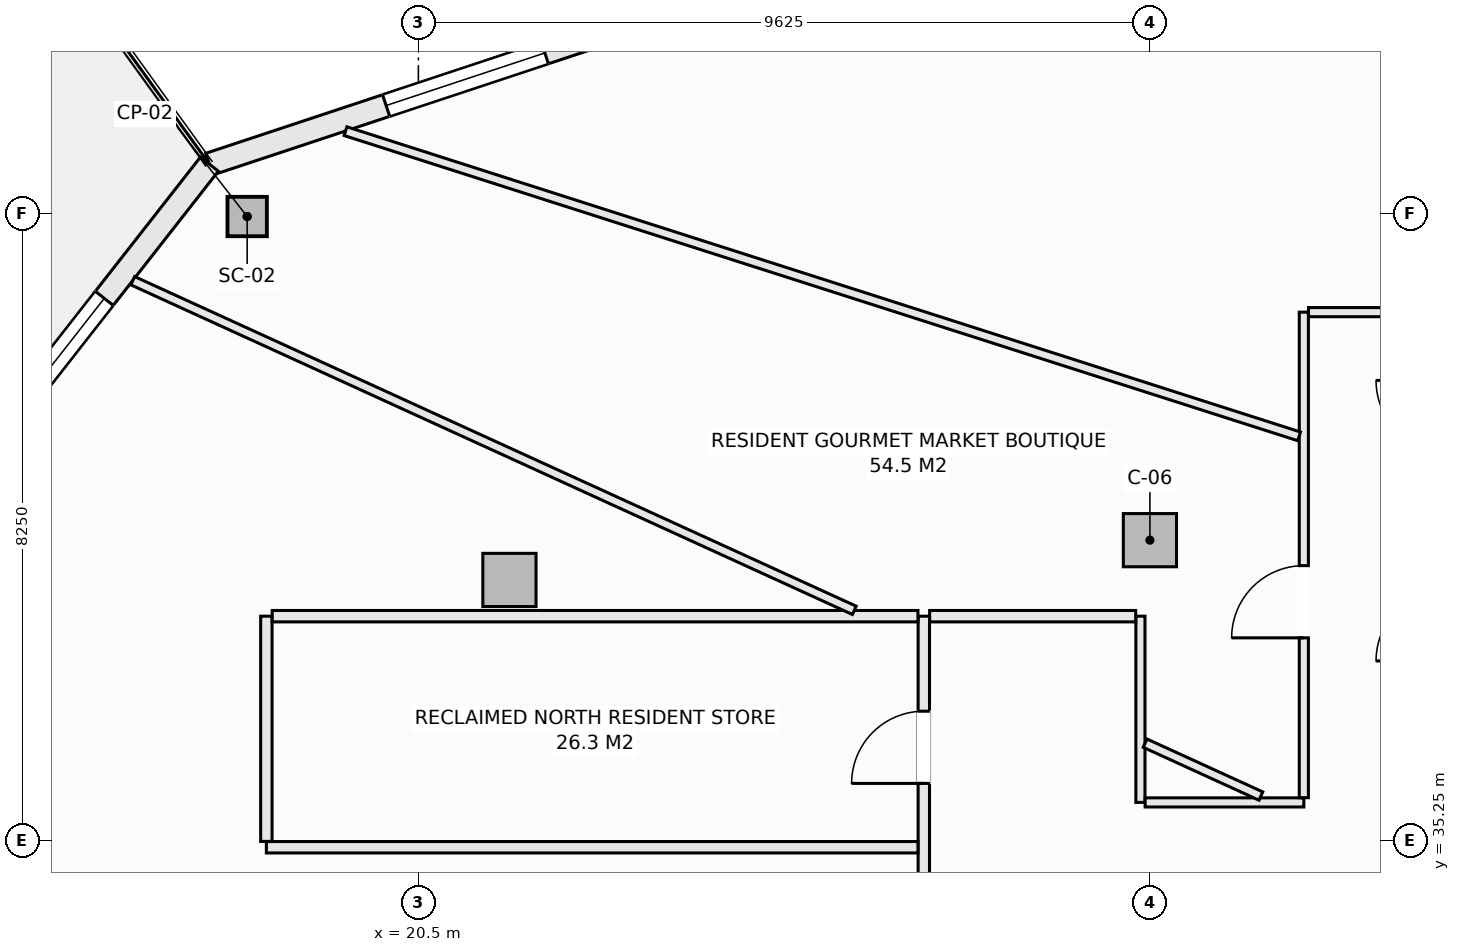
"""IFC4 building model, lengths in metres.
Left out: names, types, materials, properties, quantities, classifications, styles, units other than length and angle.
Written with IfcOpenShell. Run it as: python <this file> out.ifc"""

import sys

from ifc_helpers import new_model, si_unit, direction, frame, frame_2d, origin, origin_2d, place, context, subcontext, project, spatial, rectangle, hollow_rectangle, extrude, element, fill, save


model = new_model("IFC4")
c1 = context("Model", 3, precision=1e-05, world=origin(), true_north=direction((0.0, 1.0)))
c2 = subcontext(c1, "Body", "Model", "MODEL_VIEW")
j1 = project(units=[si_unit("LENGTHUNIT", "METRE"), si_unit("PLANEANGLEUNIT", "RADIAN")], contexts=[c1])
p1 = place(None, origin())
s1 = spatial("IfcSite", under=j1, at=p1, CompositionType="ELEMENT")
p2 = place(p1, origin())
s2 = spatial("IfcBuilding", under=s1, at=p2, CompositionType="ELEMENT")
p3 = place(p2, frame((0.0, 0.0, 236.0)))
s3 = spatial("IfcBuildingStorey", under=s2, at=p3, CompositionType="ELEMENT", Elevation=236.0)
p4 = place(p3, frame((18.247, 43.458, -0.27), z_axis=(0.0, 0.0, 1.0), x_axis=(1.0, 0.0, 0.0)))
e1 = element("IfcColumn", 1, at=p4, inside=s3, PredefinedType="COLUMN", context=c2, shape_type="SweptSolid", body=[
    extrude(hollow_rectangle(XDim=0.508, YDim=0.508, WallThickness=0.019, at=origin_2d()), origin(), (0.0, 0.0, 1.0), 3.3),
])
for number, where, z_axis, x_axis in (
    (2, (30.125, 39.2, -0.27), (0.0, 0.0, 1.0), (1.0, 0.0, 0.0)),
    (3, (21.698, 38.677, -0.27), (0.0, 0.0, 1.0), (1.0, 0.0, 0.0)),
):
    element("IfcColumn", number, at=place(p3, frame(where, z_axis=z_axis, x_axis=x_axis)), inside=s3, PredefinedType="COLUMN", context=c2, shape_type="SweptSolid", body=[
        extrude(rectangle(XDim=0.7, YDim=0.7, at=origin_2d()), origin(), (0.0, 0.0, 1.0), 3.3),
    ])
p5 = place(p3, frame((17.75, 44.147, 0.0), z_axis=(0.0, 0.0, 1.0), x_axis=(0.949240877604, 0.314550085495, 0.0)))
e4 = element("IfcWall", 4, at=p5, inside=s3, PredefinedType="SOLIDWALL", context=c2, shape_type="SweptSolid", body=[
    extrude(rectangle(XDim=6.288, YDim=0.3, at=frame_2d((3.144, 0.0))), origin(), (0.0, 0.0, 1.0), 2.605),
])
p6 = place(p5, frame((2.45, 0.0, 0.72)))
e5 = element("IfcOpeningElement", 5, at=p6, cuts=e4, PredefinedType="OPENING", context=c2, shape_type="SweptSolid", body=[
    extrude(rectangle(XDim=2.2, YDim=1.65, at=frame_2d((1.1, 0.825))), frame((0.0, 0.16, 0.0), z_axis=(0.0, -1.0, 0.0), x_axis=(1.0, 0.0, 0.0)), (0.0, 0.0, 1.0), 0.32),
])
p7 = place(p3, frame((14.117, 39.507, 0.0), z_axis=(0.0, 0.0, 1.0), x_axis=(0.616450126935, 0.787393955401, 0.0)))
e6 = element("IfcWall", 6, at=p7, inside=s3, PredefinedType="SOLIDWALL", context=c2, shape_type="SweptSolid", body=[
    extrude(rectangle(XDim=5.893, YDim=0.3, at=frame_2d((2.946, 0.0))), origin(), (0.0, 0.0, 1.0), 2.605),
])
p8 = place(p7, frame((1.45, 0.0, 0.72)))
e7 = element("IfcOpeningElement", 7, at=p8, cuts=e6, PredefinedType="OPENING", context=c2, shape_type="SweptSolid", body=[
    extrude(rectangle(XDim=2.2, YDim=1.65, at=frame_2d((1.1, 0.825))), frame((0.0, 0.16, 0.0), z_axis=(0.0, -1.0, 0.0), x_axis=(1.0, 0.0, 0.0)), (0.0, 0.0, 1.0), 0.32),
])
p9 = place(p3, frame((11.427, 41.559, 0.0), z_axis=(0.0, 0.0, 1.0), x_axis=(0.632697312147, 0.774399193699, 0.0)))
e8 = element("IfcWall", 8, at=p9, inside=s3, PredefinedType="PARAPET", context=c2, shape_type="SweptSolid", body=[
    extrude(rectangle(XDim=6.914, YDim=0.22, at=frame_2d((3.457, 0.0))), origin(), (0.0, 0.0, 1.0), 0.52),
])
p10 = place(p3, frame((27.15, 34.002, 0.0), z_axis=(0.0, 0.0, 1.0), x_axis=(0.0, 1.0, 0.0)))
e9 = element("IfcWall", 9, at=p10, inside=s3, PredefinedType="PARTITIONING", context=c2, shape_type="SweptSolid", body=[
    extrude(rectangle(XDim=4.198, YDim=0.15, at=frame_2d((2.099, 0.0))), origin(), (0.0, 0.0, 1.0), 3.03),
])
p11 = place(p10, frame((1.998, 0.0, 0.0)))
e10 = element("IfcOpeningElement", 10, at=p11, cuts=e9, PredefinedType="OPENING", context=c2, shape_type="SweptSolid", body=[
    extrude(rectangle(XDim=0.95, YDim=2.1, at=frame_2d((0.475, 1.05))), frame((0.0, 0.085, 0.0), z_axis=(0.0, -1.0, 0.0), x_axis=(1.0, 0.0, 0.0)), (0.0, 0.0, 1.0), 0.17),
])
p12 = place(p3, frame((30.0, 35.75, 0.0), z_axis=(0.0, 0.0, 1.0), x_axis=(0.0, 1.0, 0.0)))
e11 = element("IfcWall", 11, at=p12, inside=s3, PredefinedType="PARTITIONING", context=c2, shape_type="SweptSolid", body=[
    extrude(rectangle(XDim=2.45, YDim=0.12, at=frame_2d((1.225, 0.0))), origin(), (0.0, 0.0, 1.0), 3.03),
])
p13 = place(p3, frame((18.5, 35.16, 0.0), z_axis=(0.0, 0.0, 1.0), x_axis=(1.0, 0.0, 0.0)))
e12 = element("IfcWall", 12, at=p13, inside=s3, PredefinedType="PARTITIONING", context=c2, shape_type="SweptSolid", body=[
    extrude(rectangle(XDim=8.573, YDim=0.15, at=frame_2d((4.287, 0.0))), origin(), (0.0, 0.0, 1.0), 3.03),
])
p14 = place(p3, frame((18.5, 35.237, 0.0), z_axis=(0.0, 0.0, 1.0), x_axis=(0.0, 1.0, 0.0)))
e13 = element("IfcWall", 13, at=p14, inside=s3, PredefinedType="PARTITIONING", context=c2, shape_type="SweptSolid", body=[
    extrude(rectangle(XDim=2.963, YDim=0.15, at=frame_2d((1.481, 0.0))), origin(), (0.0, 0.0, 1.0), 3.03),
])
p15 = place(p3, frame((18.577, 38.2, 0.0), z_axis=(0.0, 0.0, 1.0), x_axis=(1.0, 0.0, 0.0)))
e14 = element("IfcWall", 14, at=p15, inside=s3, PredefinedType="PARTITIONING", context=c2, shape_type="SweptSolid", body=[
    extrude(rectangle(XDim=8.496, YDim=0.15, at=frame_2d((4.248, 0.0))), origin(), (0.0, 0.0, 1.0), 3.03),
])
p16 = place(p3, frame((27.227, 38.2, 0.0), z_axis=(0.0, 0.0, 1.0), x_axis=(1.0, 0.0, 0.0)))
e15 = element("IfcWall", 15, at=p16, inside=s3, PredefinedType="PARTITIONING", context=c2, shape_type="SweptSolid", body=[
    extrude(rectangle(XDim=2.711, YDim=0.15, at=frame_2d((1.355, 0.0))), origin(), (0.0, 0.0, 1.0), 3.03),
])
p17 = place(p3, frame((30.062, 35.75, 0.0), z_axis=(0.0, 0.0, 1.0), x_axis=(1.0, 0.0, 0.0)))
e16 = element("IfcWall", 16, at=p17, inside=s3, PredefinedType="PARTITIONING", context=c2, shape_type="SweptSolid", body=[
    extrude(rectangle(XDim=2.088, YDim=0.12, at=frame_2d((1.044, 0.0))), origin(), (0.0, 0.0, 1.0), 3.03),
])
p18 = place(p3, frame((32.15, 35.812, 0.0), z_axis=(0.0, 0.0, 1.0), x_axis=(0.0, 1.0, 0.0)))
e17 = element("IfcWall", 17, at=p18, inside=s3, PredefinedType="PARTITIONING", context=c2, shape_type="SweptSolid", body=[
    extrude(rectangle(XDim=6.388, YDim=0.12, at=frame_2d((3.194, 0.0))), origin(), (0.0, 0.0, 1.0), 3.03),
])
p19 = place(p18, frame((2.103, 0.0, 0.0)))
e18 = element("IfcOpeningElement", 18, at=p19, cuts=e17, PredefinedType="OPENING", context=c2, shape_type="SweptSolid", body=[
    extrude(rectangle(XDim=0.95, YDim=2.1, at=frame_2d((0.475, 1.05))), frame((0.0, 0.07, 0.0), z_axis=(0.0, -1.0, 0.0), x_axis=(1.0, 0.0, 0.0)), (0.0, 0.0, 1.0), 0.14),
])
p20 = place(p3, frame((32.212, 42.2, 0.0), z_axis=(0.0, 0.0, 1.0), x_axis=(1.0, 0.0, 0.0)))
e19 = element("IfcWall", 19, at=p20, inside=s3, PredefinedType="PARTITIONING", context=c2, shape_type="SweptSolid", body=[
    extrude(rectangle(XDim=1.838, YDim=0.12, at=frame_2d((0.919, 0.0))), origin(), (0.0, 0.0, 1.0), 3.03),
])
p21 = place(p3, frame((16.742, 42.613, 0.0), z_axis=(0.0, 0.0, 1.0), x_axis=(0.909603068398, -0.415478348365, 0.0)))
e20 = element("IfcWall", 20, at=p21, inside=s3, PredefinedType="PARTITIONING", context=c2, shape_type="SweptSolid", body=[
    extrude(rectangle(XDim=10.437, YDim=0.12, at=frame_2d((5.218, 0.0))), origin(), (0.0, 0.0, 1.0), 1.823),
])
p22 = place(p3, frame((30.062, 36.529, 0.0), z_axis=(0.0, 0.0, 1.0), x_axis=(0.909595755729, -0.415494357555, 0.0)))
e21 = element("IfcWall", 21, at=p22, inside=s3, PredefinedType="PARTITIONING", context=c2, shape_type="SweptSolid", body=[
    extrude(rectangle(XDim=1.674, YDim=0.12, at=frame_2d((0.837, 0.0))), origin(), (0.0, 0.0, 1.0), 3.03),
])
p23 = place(p3, frame((19.542, 44.581, 0.0), z_axis=(0.0, 0.0, 1.0), x_axis=(0.952423071243, -0.304779089445, 0.0)))
e22 = element("IfcWall", 22, at=p23, inside=s3, PredefinedType="PARTITIONING", context=c2, shape_type="SweptSolid", body=[
    extrude(rectangle(XDim=13.173, YDim=0.12, at=frame_2d((6.586, 0.0))), origin(), (0.0, 0.0, 1.0), 2.605),
])
p24 = place(p6, origin())
e23 = element("IfcWindow", 23, at=p24, inside=s3, PartitioningType="SINGLE_PANEL", PredefinedType="WINDOW", context=c2, shape_type="SweptSolid", body=[
    extrude(rectangle(XDim=2.2, YDim=1.65, at=frame_2d((1.1, 0.825))), frame((0.0, 0.03, 0.0), z_axis=(0.0, -1.0, 0.0), x_axis=(1.0, 0.0, 0.0)), (0.0, 0.0, 1.0), 0.06),
])
fill(e5, e23)
p25 = place(p8, origin())
e24 = element("IfcWindow", 24, at=p25, inside=s3, PartitioningType="SINGLE_PANEL", PredefinedType="WINDOW", context=c2, shape_type="SweptSolid", body=[
    extrude(rectangle(XDim=2.2, YDim=1.65, at=frame_2d((1.1, 0.825))), frame((0.0, 0.03, 0.0), z_axis=(0.0, -1.0, 0.0), x_axis=(1.0, 0.0, 0.0)), (0.0, 0.0, 1.0), 0.06),
])
fill(e7, e24)
p26 = place(p11, origin())
e25 = element("IfcDoor", 25, at=p26, inside=s3, OperationType="SINGLE_SWING_LEFT", PredefinedType="DOOR", context=c2, shape_type="SweptSolid", body=[
    extrude(rectangle(XDim=0.95, YDim=2.1, at=frame_2d((0.475, 1.05))), frame((0.0, 0.025, 0.0), z_axis=(0.0, -1.0, 0.0), x_axis=(1.0, 0.0, 0.0)), (0.0, 0.0, 1.0), 0.05),
])
fill(e10, e25)
p27 = place(p19, origin())
e26 = element("IfcDoor", 26, at=p27, inside=s3, OperationType="SINGLE_SWING_LEFT", PredefinedType="DOOR", context=c2, shape_type="SweptSolid", body=[
    extrude(rectangle(XDim=0.95, YDim=2.1, at=frame_2d((0.475, 1.05))), frame((0.0, 0.025, 0.0), z_axis=(0.0, -1.0, 0.0), x_axis=(1.0, 0.0, 0.0)), (0.0, 0.0, 1.0), 0.05),
])
fill(e18, e26)
save(model, sys.argv[1])
